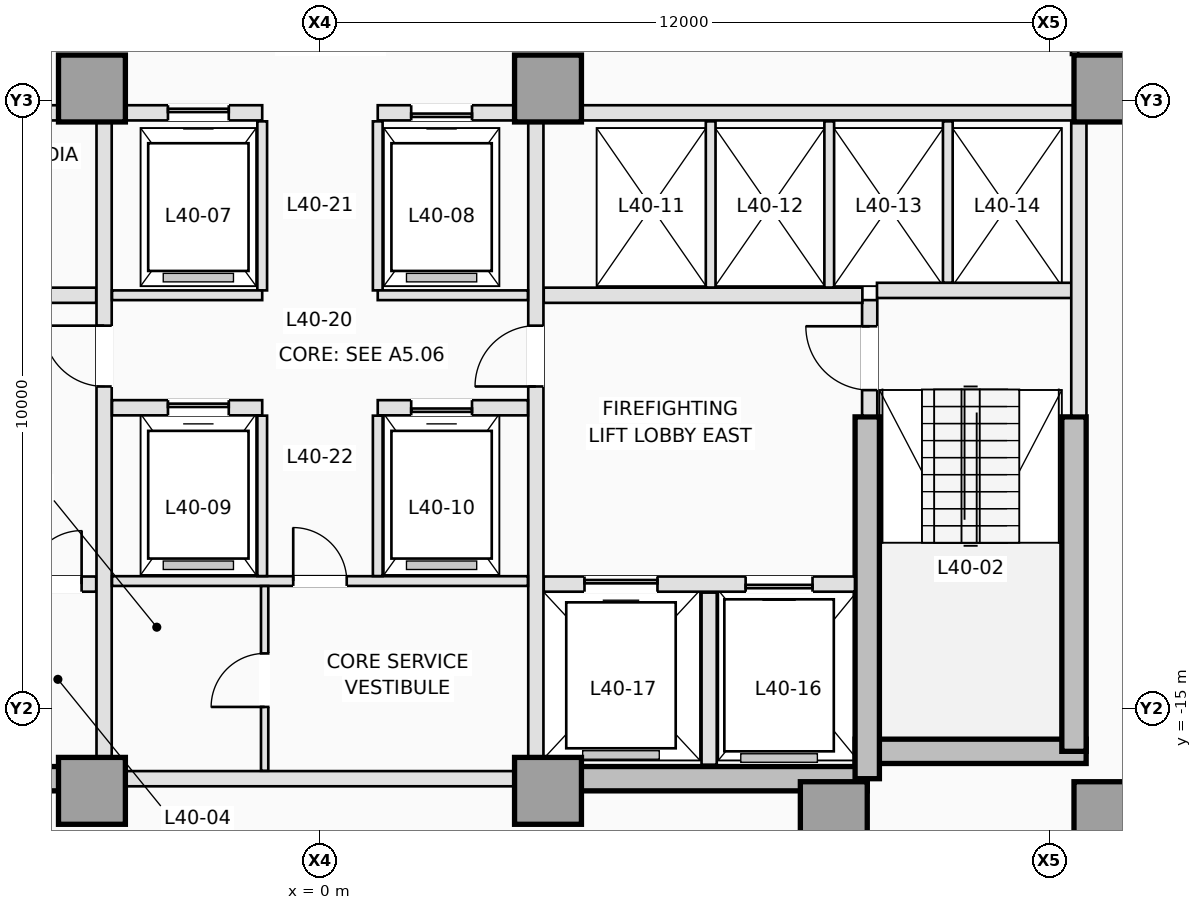
"""IFC4 building model, lengths in metres.
Left out: names, types, materials, properties, quantities, classifications, styles, units other than length and angle.
Written with IfcOpenShell. Run it as: python <this file> out.ifc"""

import sys

from ifc_helpers import new_model, si_unit, direction, frame, frame_2d, origin, origin_2d, place, context, subcontext, project, spatial, rectangle, extrude, element, fill, save


model = new_model("IFC4")
c1 = context("Model", 3, precision=1e-05, world=origin(), true_north=direction((0.0, 1.0)))
c2 = subcontext(c1, "Body", "Model", "MODEL_VIEW")
j1 = project(units=[si_unit("LENGTHUNIT", "METRE"), si_unit("PLANEANGLEUNIT", "RADIAN")], contexts=[c1])
p1 = place(None, origin())
s1 = spatial("IfcSite", under=j1, at=p1, CompositionType="ELEMENT")
p2 = place(p1, origin())
s2 = spatial("IfcBuilding", under=s1, at=p2, CompositionType="ELEMENT")
p3 = place(p2, frame((0.0, 0.0, 147.5)))
s3 = spatial("IfcBuildingStorey", under=s2, at=p3, CompositionType="ELEMENT", Elevation=147.5)
for number, where, z_axis, x_axis in (
    (1, (-9.0, -16.15, 0.0), (0.0, 0.0, 1.0), (1.0, 0.0, 0.0)),
    (2, (3.75, -16.15, 0.0), (0.0, 0.0, 1.0), (1.0, 0.0, 0.0)),
):
    element("IfcWall", number, at=place(p3, frame(where, z_axis=z_axis, x_axis=x_axis)), inside=s3, PredefinedType="SHEAR", context=c2, shape_type="SweptSolid", body=[
        extrude(rectangle(XDim=5.25, YDim=0.4, at=frame_2d((2.625, 0.0))), origin(), (0.0, 0.0, 1.0), 3.5),
    ])
p4 = place(p3, frame((8.8, -15.7, 0.0), z_axis=(0.0, 0.0, 1.0), x_axis=(1.0, 0.0, 0.0)))
e3 = element("IfcWall", 3, at=p4, inside=s3, PredefinedType="SHEAR", context=c2, shape_type="SweptSolid", body=[
    extrude(rectangle(XDim=3.8, YDim=0.4, at=frame_2d((1.9, 0.0))), origin(), (0.0, 0.0, 1.0), 3.5),
])
p5 = place(p3, frame((12.4, -15.7, 0.0), z_axis=(0.0, 0.0, 1.0), x_axis=(0.0, 1.0, 0.0)))
e4 = element("IfcWall", 4, at=p5, inside=s3, PredefinedType="SHEAR", context=c2, shape_type="SweptSolid", body=[
    extrude(rectangle(XDim=5.5, YDim=0.4, at=frame_2d((2.75, 0.0))), origin(), (0.0, 0.0, 1.0), 3.5),
])
p6 = place(p3, frame((9.0, -16.15, 0.0), z_axis=(0.0, 0.0, 1.0), x_axis=(0.0, 1.0, 0.0)))
e5 = element("IfcWall", 5, at=p6, inside=s3, PredefinedType="SHEAR", context=c2, shape_type="SweptSolid", body=[
    extrude(rectangle(XDim=5.95, YDim=0.4, at=frame_2d((2.975, 0.0))), origin(), (0.0, 0.0, 1.0), 3.5),
])
for number, where, z_axis, x_axis in (
    (6, (-3.75, -16.35, 0.0), (0.0, 0.0, 1.0), (1.0, 0.0, 0.0)),
    (7, (3.75, -16.35, 0.0), (0.0, 0.0, 1.0), (1.0, 0.0, 0.0)),
    (8, (8.45, -16.75, 0.0), (0.0, 0.0, 1.0), (1.0, 0.0, 0.0)),
    (9, (12.95, -16.75, 0.0), (0.0, 0.0, 1.0), (1.0, 0.0, 0.0)),
    (10, (-3.75, -4.8, 0.0), (0.0, 0.0, 1.0), (1.0, 0.0, 0.0)),
    (11, (3.75, -4.8, 0.0), (0.0, 0.0, 1.0), (1.0, 0.0, 0.0)),
    (12, (12.95, -4.8, 0.0), (0.0, 0.0, 1.0), (1.0, 0.0, 0.0)),
):
    element("IfcColumn", number, at=place(p3, frame(where, z_axis=z_axis, x_axis=x_axis)), inside=s3, PredefinedType="COLUMN", context=c2, shape_type="SweptSolid", body=[
        extrude(rectangle(XDim=1.1, YDim=1.1, at=origin_2d()), origin(), (0.0, 0.0, 1.0), 3.5),
    ])
p7 = place(p3, frame((9.04, -10.18, 0.0), z_axis=(0.0, 0.0, 1.0), x_axis=(0.0, 1.0, 0.0)))
e13 = element("IfcWall", 13, at=p7, inside=s3, PredefinedType="PARTITIONING", context=c2, shape_type="SweptSolid", body=[
    extrude(rectangle(XDim=1.9, YDim=0.25, at=frame_2d((0.95, 0.0))), origin(), (0.0, 0.0, 1.0), 3.25),
])
p8 = place(p7, frame((0.42, 0.0, 0.0)))
e14 = element("IfcOpeningElement", 14, at=p8, cuts=e13, PredefinedType="OPENING", context=c2, shape_type="SweptSolid", body=[
    extrude(rectangle(XDim=1.05, YDim=2.15, at=frame_2d((0.525, 1.075))), frame((0.0, 0.135, 0.0), z_axis=(0.0, -1.0, 0.0), x_axis=(1.0, 0.0, 0.0)), (0.0, 0.0, 1.0), 0.27),
])
p9 = place(p3, frame((9.16, -8.12, 0.0), z_axis=(0.0, 0.0, 1.0), x_axis=(1.0, 0.0, 0.0)))
e15 = element("IfcWall", 15, at=p9, inside=s3, PredefinedType="PARTITIONING", context=c2, shape_type="SweptSolid", body=[
    extrude(rectangle(XDim=3.22, YDim=0.25, at=frame_2d((1.61, 0.0))), origin(), (0.0, 0.0, 1.0), 3.25),
])
p10 = place(p3, frame((12.48, -10.18, 0.0), z_axis=(0.0, 0.0, 1.0), x_axis=(0.0, 1.0, 0.0)))
e16 = element("IfcWall", 16, at=p10, inside=s3, PredefinedType="PARTITIONING", context=c2, shape_type="SweptSolid", body=[
    extrude(rectangle(XDim=4.828, YDim=0.25, at=frame_2d((2.414, 0.0))), origin(), (0.0, 0.0, 1.0), 3.25),
])
p11 = place(p3, frame((-8.798, -12.95, 0.0), z_axis=(0.0, 0.0, 1.0), x_axis=(1.0, 0.0, 0.0)))
e17 = element("IfcWall", 17, at=p11, inside=s3, PredefinedType="PARTITIONING", context=c2, shape_type="SweptSolid", body=[
    extrude(rectangle(XDim=5.118, YDim=0.25, at=frame_2d((2.559, 0.0))), origin(), (0.0, 0.0, 1.0), 3.25),
])
p12 = place(p11, frame((0.698, 0.0, 0.0)))
e18 = element("IfcOpeningElement", 18, at=p12, cuts=e17, PredefinedType="OPENING", context=c2, shape_type="SweptSolid", body=[
    extrude(rectangle(XDim=1.1, YDim=2.15, at=frame_2d((0.55, 1.075))), frame((0.0, 0.135, 0.0), z_axis=(0.0, -1.0, 0.0), x_axis=(1.0, 0.0, 0.0)), (0.0, 0.0, 1.0), 0.27),
])
p13 = place(p11, frame((2.598, 0.0, 0.0)))
e19 = element("IfcOpeningElement", 19, at=p13, cuts=e17, PredefinedType="OPENING", context=c2, shape_type="SweptSolid", body=[
    extrude(rectangle(XDim=0.88, YDim=2.1, at=frame_2d((0.44, 1.05))), frame((0.0, 0.135, 0.0), z_axis=(0.0, -1.0, 0.0), x_axis=(1.0, 0.0, 0.0)), (0.0, 0.0, 1.0), 0.27),
])
p14 = place(p11, frame((3.998, 0.0, 0.0)))
e20 = element("IfcOpeningElement", 20, at=p14, cuts=e17, PredefinedType="OPENING", context=c2, shape_type="SweptSolid", body=[
    extrude(rectangle(XDim=0.88, YDim=2.1, at=frame_2d((0.44, 1.05))), frame((0.0, 0.135, 0.0), z_axis=(0.0, -1.0, 0.0), x_axis=(1.0, 0.0, 0.0)), (0.0, 0.0, 1.0), 0.27),
])
p15 = place(p3, frame((3.68, -12.95, 0.0), z_axis=(0.0, 0.0, 1.0), x_axis=(1.0, 0.0, 0.0)))
e21 = element("IfcWall", 21, at=p15, inside=s3, PredefinedType="PARTITIONING", context=c2, shape_type="SweptSolid", body=[
    extrude(rectangle(XDim=5.118, YDim=0.25, at=frame_2d((2.559, 0.0))), origin(), (0.0, 0.0, 1.0), 3.25),
])
p16 = place(p15, frame((3.32, 0.0, 0.0)))
e22 = element("IfcOpeningElement", 22, at=p16, cuts=e21, PredefinedType="OPENING", context=c2, shape_type="SweptSolid", body=[
    extrude(rectangle(XDim=1.1, YDim=2.15, at=frame_2d((0.55, 1.075))), frame((0.0, 0.135, 0.0), z_axis=(0.0, -1.0, 0.0), x_axis=(1.0, 0.0, 0.0)), (0.0, 0.0, 1.0), 0.27),
])
p17 = place(p15, frame((0.67, 0.0, 0.0)))
e23 = element("IfcOpeningElement", 23, at=p17, cuts=e21, PredefinedType="OPENING", context=c2, shape_type="SweptSolid", body=[
    extrude(rectangle(XDim=1.2, YDim=2.15, at=frame_2d((0.6, 1.075))), frame((0.0, 0.135, 0.0), z_axis=(0.0, -1.0, 0.0), x_axis=(1.0, 0.0, 0.0)), (0.0, 0.0, 1.0), 0.27),
])
p18 = place(p3, frame((6.4, -15.92, 0.0), z_axis=(0.0, 0.0, 1.0), x_axis=(0.0, 1.0, 0.0)))
e24 = element("IfcWall", 24, at=p18, inside=s3, PredefinedType="PARTITIONING", context=c2, shape_type="SweptSolid", body=[
    extrude(rectangle(XDim=2.83, YDim=0.25, at=frame_2d((1.415, 0.0))), origin(), (0.0, 0.0, 1.0), 3.25),
])
for number, where, z_axis, x_axis in (
    (25, (-8.92, -8.2, 0.0), (0.0, 0.0, 1.0), (1.0, 0.0, 0.0)),
    (26, (3.68, -8.2, 0.0), (0.0, 0.0, 1.0), (1.0, 0.0, 0.0)),
):
    element("IfcWall", number, at=place(p3, frame(where, z_axis=z_axis, x_axis=x_axis)), inside=s3, PredefinedType="PARTITIONING", context=c2, shape_type="SweptSolid", body=[
        extrude(rectangle(XDim=5.24, YDim=0.25, at=frame_2d((2.62, 0.0))), origin(), (0.0, 0.0, 1.0), 3.25),
    ])
p19 = place(p3, frame((-3.55, -15.798, 0.0), z_axis=(0.0, 0.0, 1.0), x_axis=(0.0, 1.0, 0.0)))
e27 = element("IfcWall", 27, at=p19, inside=s3, PredefinedType="PARTITIONING", context=c2, shape_type="SweptSolid", body=[
    extrude(rectangle(XDim=10.446, YDim=0.25, at=frame_2d((5.223, 0.0))), origin(), (0.0, 0.0, 1.0), 3.25),
])
p20 = place(p19, frame((6.098, 0.0, 0.0)))
e28 = element("IfcOpeningElement", 28, at=p20, cuts=e27, PredefinedType="OPENING", context=c2, shape_type="SweptSolid", body=[
    extrude(rectangle(XDim=1.0, YDim=2.15, at=frame_2d((0.5, 1.075))), frame((0.0, 0.135, 0.0), z_axis=(0.0, -1.0, 0.0), x_axis=(1.0, 0.0, 0.0)), (0.0, 0.0, 1.0), 0.27),
])
p21 = place(p3, frame((3.55, -15.798, 0.0), z_axis=(0.0, 0.0, 1.0), x_axis=(0.0, 1.0, 0.0)))
e29 = element("IfcWall", 29, at=p21, inside=s3, PredefinedType="PARTITIONING", context=c2, shape_type="SweptSolid", body=[
    extrude(rectangle(XDim=10.446, YDim=0.25, at=frame_2d((5.223, 0.0))), origin(), (0.0, 0.0, 1.0), 3.25),
])
p22 = place(p21, frame((6.098, 0.0, 0.0)))
e30 = element("IfcOpeningElement", 30, at=p22, cuts=e29, PredefinedType="OPENING", context=c2, shape_type="SweptSolid", body=[
    extrude(rectangle(XDim=1.0, YDim=2.15, at=frame_2d((0.5, 1.075))), frame((0.0, 0.135, 0.0), z_axis=(0.0, -1.0, 0.0), x_axis=(1.0, 0.0, 0.0)), (0.0, 0.0, 1.0), 0.27),
])
p23 = place(p3, frame((-12.398, -5.2, 0.0), z_axis=(0.0, 0.0, 1.0), x_axis=(1.0, 0.0, 0.0)))
e31 = element("IfcWall", 31, at=p23, inside=s3, PredefinedType="PARTITIONING", context=c2, shape_type="SweptSolid", body=[
    extrude(rectangle(XDim=8.096, YDim=0.25, at=frame_2d((4.048, 0.0))), origin(), (0.0, 0.0, 1.0), 3.25),
])
p24 = place(p23, frame((2.968, 0.0, 0.0)))
e32 = element("IfcOpeningElement", 32, at=p24, cuts=e31, PredefinedType="OPENING", context=c2, shape_type="SweptSolid", body=[
    extrude(rectangle(XDim=0.92, YDim=2.12, at=frame_2d((0.46, 1.06))), frame((0.0, 0.135, 0.0), z_axis=(0.0, -1.0, 0.0), x_axis=(1.0, 0.0, 0.0)), (0.0, 0.0, 1.0), 0.27),
])
p25 = place(p23, frame((6.068, 0.0, 0.0)))
e33 = element("IfcOpeningElement", 33, at=p25, cuts=e31, PredefinedType="OPENING", context=c2, shape_type="SweptSolid", body=[
    extrude(rectangle(XDim=0.92, YDim=2.12, at=frame_2d((0.46, 1.06))), frame((0.0, 0.135, 0.0), z_axis=(0.0, -1.0, 0.0), x_axis=(1.0, 0.0, 0.0)), (0.0, 0.0, 1.0), 0.27),
])
p26 = place(p3, frame((4.302, -5.2, 0.0), z_axis=(0.0, 0.0, 1.0), x_axis=(1.0, 0.0, 0.0)))
e34 = element("IfcWall", 34, at=p26, inside=s3, PredefinedType="PARTITIONING", context=c2, shape_type="SweptSolid", body=[
    extrude(rectangle(XDim=8.096, YDim=0.25, at=frame_2d((4.048, 0.0))), origin(), (0.0, 0.0, 1.0), 3.25),
])
p27 = place(p3, frame((-3.198, -5.2, 0.0), z_axis=(0.0, 0.0, 1.0), x_axis=(1.0, 0.0, 0.0)))
e35 = element("IfcWall", 35, at=p27, inside=s3, PredefinedType="PARTITIONING", context=c2, shape_type="SweptSolid", body=[
    extrude(rectangle(XDim=2.248, YDim=0.25, at=frame_2d((1.124, 0.0))), origin(), (0.0, 0.0, 1.0), 3.25),
])
p28 = place(p27, frame((0.698, 0.0, 0.0)))
e36 = element("IfcOpeningElement", 36, at=p28, cuts=e35, PredefinedType="OPENING", context=c2, shape_type="SweptSolid", body=[
    extrude(rectangle(XDim=1.0, YDim=2.15, at=frame_2d((0.5, 1.075))), frame((0.0, 0.135, 0.0), z_axis=(0.0, -1.0, 0.0), x_axis=(1.0, 0.0, 0.0)), (0.0, 0.0, 1.0), 0.27),
])
p29 = place(p3, frame((0.95, -5.2, 0.0), z_axis=(0.0, 0.0, 1.0), x_axis=(1.0, 0.0, 0.0)))
e37 = element("IfcWall", 37, at=p29, inside=s3, PredefinedType="PARTITIONING", context=c2, shape_type="SweptSolid", body=[
    extrude(rectangle(XDim=2.248, YDim=0.25, at=frame_2d((1.124, 0.0))), origin(), (0.0, 0.0, 1.0), 3.25),
])
p30 = place(p29, frame((0.55, 0.0, 0.0)))
e38 = element("IfcOpeningElement", 38, at=p30, cuts=e37, PredefinedType="OPENING", context=c2, shape_type="SweptSolid", body=[
    extrude(rectangle(XDim=1.0, YDim=2.15, at=frame_2d((0.5, 1.075))), frame((0.0, 0.135, 0.0), z_axis=(0.0, -1.0, 0.0), x_axis=(1.0, 0.0, 0.0)), (0.0, 0.0, 1.0), 0.27),
])
for number, where, z_axis, x_axis in (
    (39, (6.425, -8.073, 0.0), (0.0, 0.0, 1.0), (0.0, 1.0, 0.0)),
    (40, (8.375, -8.073, 0.0), (0.0, 0.0, 1.0), (0.0, 1.0, 0.0)),
):
    element("IfcWall", number, at=place(p3, frame(where, z_axis=z_axis, x_axis=x_axis)), inside=s3, PredefinedType="PARTITIONING", context=c2, shape_type="SweptSolid", body=[
        extrude(rectangle(XDim=2.733, YDim=0.16, at=frame_2d((1.366, 0.0))), origin(), (0.0, 0.0, 1.0), 3.25),
    ])
p31 = place(p3, frame((10.325, -7.993, 0.0), z_axis=(0.0, 0.0, 1.0), x_axis=(0.0, 1.0, 0.0)))
e41 = element("IfcWall", 41, at=p31, inside=s3, PredefinedType="PARTITIONING", context=c2, shape_type="SweptSolid", body=[
    extrude(rectangle(XDim=2.653, YDim=0.16, at=frame_2d((1.326, 0.0))), origin(), (0.0, 0.0, 1.0), 3.25),
])
p32 = place(p3, frame((-3.198, -16.15, 0.0), z_axis=(0.0, 0.0, 1.0), x_axis=(1.0, 0.0, 0.0)))
e42 = element("IfcWall", 42, at=p32, inside=s3, PredefinedType="PARTITIONING", context=c2, shape_type="SweptSolid", body=[
    extrude(rectangle(XDim=6.396, YDim=0.25, at=frame_2d((3.198, 0.0))), origin(), (0.0, 0.0, 1.0), 2.45),
])
for number, where, z_axis, x_axis in (
    (43, (-0.95, -8.12, 0.0), (0.0, 0.0, 1.0), (0.0, 1.0, 0.0)),
    (44, (0.95, -8.12, 0.0), (0.0, 0.0, 1.0), (0.0, 1.0, 0.0)),
):
    element("IfcWall", number, at=place(p3, frame(where, z_axis=z_axis, x_axis=x_axis)), inside=s3, PredefinedType="PARTITIONING", context=c2, shape_type="SweptSolid", body=[
        extrude(rectangle(XDim=2.78, YDim=0.16, at=frame_2d((1.39, 0.0))), origin(), (0.0, 0.0, 1.0), 3.25),
    ])
for number, where, z_axis, x_axis in (
    (45, (-3.42, -8.2, 0.0), (0.0, 0.0, 1.0), (1.0, 0.0, 0.0)),
    (46, (0.95, -8.2, 0.0), (0.0, 0.0, 1.0), (1.0, 0.0, 0.0)),
):
    element("IfcWall", number, at=place(p3, frame(where, z_axis=z_axis, x_axis=x_axis)), inside=s3, PredefinedType="PARTITIONING", context=c2, shape_type="SweptSolid", body=[
        extrude(rectangle(XDim=2.47, YDim=0.16, at=frame_2d((1.235, 0.0))), origin(), (0.0, 0.0, 1.0), 3.25),
    ])
p33 = place(p3, frame((-3.42, -10.05, 0.0), z_axis=(0.0, 0.0, 1.0), x_axis=(1.0, 0.0, 0.0)))
e47 = element("IfcWall", 47, at=p33, inside=s3, PredefinedType="PARTITIONING", context=c2, shape_type="SweptSolid", body=[
    extrude(rectangle(XDim=2.47, YDim=0.25, at=frame_2d((1.235, 0.0))), origin(), (0.0, 0.0, 1.0), 3.25),
])
p34 = place(p33, frame((0.92, 0.0, 0.0)))
e48 = element("IfcOpeningElement", 48, at=p34, cuts=e47, PredefinedType="OPENING", context=c2, shape_type="SweptSolid", body=[
    extrude(rectangle(XDim=1.0, YDim=2.15, at=frame_2d((0.5, 1.075))), frame((0.0, 0.135, 0.0), z_axis=(0.0, -1.0, 0.0), x_axis=(1.0, 0.0, 0.0)), (0.0, 0.0, 1.0), 0.27),
])
p35 = place(p3, frame((0.95, -10.05, 0.0), z_axis=(0.0, 0.0, 1.0), x_axis=(1.0, 0.0, 0.0)))
e49 = element("IfcWall", 49, at=p35, inside=s3, PredefinedType="PARTITIONING", context=c2, shape_type="SweptSolid", body=[
    extrude(rectangle(XDim=2.47, YDim=0.25, at=frame_2d((1.235, 0.0))), origin(), (0.0, 0.0, 1.0), 3.25),
])
p36 = place(p35, frame((0.55, 0.0, 0.0)))
e50 = element("IfcOpeningElement", 50, at=p36, cuts=e49, PredefinedType="OPENING", context=c2, shape_type="SweptSolid", body=[
    extrude(rectangle(XDim=1.0, YDim=2.15, at=frame_2d((0.5, 1.075))), frame((0.0, 0.135, 0.0), z_axis=(0.0, -1.0, 0.0), x_axis=(1.0, 0.0, 0.0)), (0.0, 0.0, 1.0), 0.27),
])
p37 = place(p3, frame((-3.42, -12.9, 0.0), z_axis=(0.0, 0.0, 1.0), x_axis=(1.0, 0.0, 0.0)))
e51 = element("IfcWall", 51, at=p37, inside=s3, PredefinedType="PARTITIONING", context=c2, shape_type="SweptSolid", body=[
    extrude(rectangle(XDim=6.84, YDim=0.16, at=frame_2d((3.42, 0.0))), origin(), (0.0, 0.0, 1.0), 3.25),
])
p38 = place(p37, frame((2.98, 0.0, 0.0)))
e52 = element("IfcOpeningElement", 52, at=p38, cuts=e51, PredefinedType="OPENING", context=c2, shape_type="SweptSolid", body=[
    extrude(rectangle(XDim=0.88, YDim=2.12, at=frame_2d((0.44, 1.06))), frame((0.0, 0.09, 0.0), z_axis=(0.0, -1.0, 0.0), x_axis=(1.0, 0.0, 0.0)), (0.0, 0.0, 1.0), 0.18),
])
for number, where, z_axis, x_axis in (
    (53, (-0.95, -12.818, 0.0), (0.0, 0.0, 1.0), (0.0, 1.0, 0.0)),
    (54, (0.95, -12.818, 0.0), (0.0, 0.0, 1.0), (0.0, 1.0, 0.0)),
):
    element("IfcWall", number, at=place(p3, frame(where, z_axis=z_axis, x_axis=x_axis)), inside=s3, PredefinedType="PARTITIONING", context=c2, shape_type="SweptSolid", body=[
        extrude(rectangle(XDim=2.638, YDim=0.16, at=frame_2d((1.319, 0.0))), origin(), (0.0, 0.0, 1.0), 3.25),
    ])
p39 = place(p3, frame((-0.91, -16.02, 0.0), z_axis=(0.0, 0.0, 1.0), x_axis=(0.0, 1.0, 0.0)))
e55 = element("IfcWall", 55, at=p39, inside=s3, PredefinedType="PARTITIONING", context=c2, shape_type="SweptSolid", body=[
    extrude(rectangle(XDim=3.038, YDim=0.12, at=frame_2d((1.519, 0.0))), origin(), (0.0, 0.0, 1.0), 3.25),
])
p40 = place(p39, frame((1.05, 0.0, 0.0)))
e56 = element("IfcOpeningElement", 56, at=p40, cuts=e55, PredefinedType="OPENING", context=c2, shape_type="SweptSolid", body=[
    extrude(rectangle(XDim=0.88, YDim=2.12, at=frame_2d((0.44, 1.06))), frame((0.0, 0.07, 0.0), z_axis=(0.0, -1.0, 0.0), x_axis=(1.0, 0.0, 0.0)), (0.0, 0.0, 1.0), 0.14),
])
p41 = place(p3, frame((12.41, -2.462, 0.0), z_axis=(0.0, 0.0, 1.0), x_axis=(0.0, -1.0, 0.0)))
e57 = element("IfcWall", 57, at=p41, inside=s3, PredefinedType="PARTITIONING", context=c2, shape_type="SweptSolid", body=[
    extrude(rectangle(XDim=1.786, YDim=0.12, at=frame_2d((0.893, 0.0))), origin(), (0.0, 0.0, 1.0), 3.25),
])
p42 = place(p28, origin())
e58 = element("IfcDoor", 58, at=p42, inside=s3, OperationType="SLIDING_TO_LEFT", PredefinedType="DOOR", context=c2, shape_type="SweptSolid", body=[
    extrude(rectangle(XDim=1.0, YDim=2.15, at=frame_2d((0.5, 1.075))), frame((0.0, 0.025, 0.0), z_axis=(0.0, -1.0, 0.0), x_axis=(1.0, 0.0, 0.0)), (0.0, 0.0, 1.0), 0.05),
])
fill(e36, e58)
p43 = place(p30, origin())
e59 = element("IfcDoor", 59, at=p43, inside=s3, OperationType="SLIDING_TO_RIGHT", PredefinedType="DOOR", context=c2, shape_type="SweptSolid", body=[
    extrude(rectangle(XDim=1.0, YDim=2.15, at=frame_2d((0.5, 1.075))), frame((0.0, 0.025, 0.0), z_axis=(0.0, -1.0, 0.0), x_axis=(1.0, 0.0, 0.0)), (0.0, 0.0, 1.0), 0.05),
])
fill(e38, e59)
p44 = place(p16, origin())
e60 = element("IfcDoor", 60, at=p44, inside=s3, OperationType="SLIDING_TO_RIGHT", PredefinedType="DOOR", context=c2, shape_type="SweptSolid", body=[
    extrude(rectangle(XDim=1.1, YDim=2.15, at=frame_2d((0.55, 1.075))), frame((0.0, 0.025, 0.0), z_axis=(0.0, -1.0, 0.0), x_axis=(1.0, 0.0, 0.0)), (0.0, 0.0, 1.0), 0.05),
])
fill(e22, e60)
p45 = place(p17, origin())
e61 = element("IfcDoor", 61, at=p45, inside=s3, OperationType="SLIDING_TO_LEFT", PredefinedType="DOOR", context=c2, shape_type="SweptSolid", body=[
    extrude(rectangle(XDim=1.2, YDim=2.15, at=frame_2d((0.6, 1.075))), frame((0.0, 0.025, 0.0), z_axis=(0.0, -1.0, 0.0), x_axis=(1.0, 0.0, 0.0)), (0.0, 0.0, 1.0), 0.05),
])
fill(e23, e61)
p46 = place(p34, origin())
e62 = element("IfcDoor", 62, at=p46, inside=s3, OperationType="SLIDING_TO_LEFT", PredefinedType="DOOR", context=c2, shape_type="SweptSolid", body=[
    extrude(rectangle(XDim=1.0, YDim=2.15, at=frame_2d((0.5, 1.075))), frame((0.0, 0.025, 0.0), z_axis=(0.0, -1.0, 0.0), x_axis=(1.0, 0.0, 0.0)), (0.0, 0.0, 1.0), 0.05),
])
fill(e48, e62)
p47 = place(p36, origin())
e63 = element("IfcDoor", 63, at=p47, inside=s3, OperationType="SLIDING_TO_RIGHT", PredefinedType="DOOR", context=c2, shape_type="SweptSolid", body=[
    extrude(rectangle(XDim=1.0, YDim=2.15, at=frame_2d((0.5, 1.075))), frame((0.0, 0.025, 0.0), z_axis=(0.0, -1.0, 0.0), x_axis=(1.0, 0.0, 0.0)), (0.0, 0.0, 1.0), 0.05),
])
fill(e50, e63)
p48 = place(p8, origin())
e64 = element("IfcDoor", 64, at=p48, inside=s3, OperationType="SINGLE_SWING_RIGHT", PredefinedType="DOOR", context=c2, shape_type="SweptSolid", body=[
    extrude(rectangle(XDim=1.05, YDim=2.15, at=frame_2d((0.525, 1.075))), frame((0.0, 0.025, 0.0), z_axis=(0.0, -1.0, 0.0), x_axis=(1.0, 0.0, 0.0)), (0.0, 0.0, 1.0), 0.05),
])
fill(e14, e64)
p49 = place(p14, origin())
e65 = element("IfcDoor", 65, at=p49, inside=s3, OperationType="SINGLE_SWING_RIGHT", PredefinedType="TRAPDOOR", context=c2, shape_type="SweptSolid", body=[
    extrude(rectangle(XDim=0.88, YDim=2.1, at=frame_2d((0.44, 1.05))), frame((0.0, 0.025, 0.0), z_axis=(0.0, -1.0, 0.0), x_axis=(1.0, 0.0, 0.0)), (0.0, 0.0, 1.0), 0.05),
])
fill(e20, e65)
p50 = place(p20, origin())
e66 = element("IfcDoor", 66, at=p50, inside=s3, OperationType="SINGLE_SWING_RIGHT", PredefinedType="DOOR", context=c2, shape_type="SweptSolid", body=[
    extrude(rectangle(XDim=1.0, YDim=2.15, at=frame_2d((0.5, 1.075))), frame((0.0, 0.025, 0.0), z_axis=(0.0, -1.0, 0.0), x_axis=(1.0, 0.0, 0.0)), (0.0, 0.0, 1.0), 0.05),
])
fill(e28, e66)
p51 = place(p22, origin())
e67 = element("IfcDoor", 67, at=p51, inside=s3, OperationType="SINGLE_SWING_LEFT", PredefinedType="DOOR", context=c2, shape_type="SweptSolid", body=[
    extrude(rectangle(XDim=1.0, YDim=2.15, at=frame_2d((0.5, 1.075))), frame((0.0, 0.025, 0.0), z_axis=(0.0, -1.0, 0.0), x_axis=(1.0, 0.0, 0.0)), (0.0, 0.0, 1.0), 0.05),
])
fill(e30, e67)
p52 = place(p38, origin())
e68 = element("IfcDoor", 68, at=p52, inside=s3, OperationType="SINGLE_SWING_LEFT", PredefinedType="DOOR", context=c2, shape_type="SweptSolid", body=[
    extrude(rectangle(XDim=0.88, YDim=2.12, at=frame_2d((0.44, 1.06))), frame((0.0, 0.025, 0.0), z_axis=(0.0, -1.0, 0.0), x_axis=(1.0, 0.0, 0.0)), (0.0, 0.0, 1.0), 0.05),
])
fill(e52, e68)
p53 = place(p40, origin())
e69 = element("IfcDoor", 69, at=p53, inside=s3, OperationType="SINGLE_SWING_LEFT", PredefinedType="DOOR", context=c2, shape_type="SweptSolid", body=[
    extrude(rectangle(XDim=0.88, YDim=2.12, at=frame_2d((0.44, 1.06))), frame((0.0, 0.025, 0.0), z_axis=(0.0, -1.0, 0.0), x_axis=(1.0, 0.0, 0.0)), (0.0, 0.0, 1.0), 0.05),
])
fill(e56, e69)
save(model, sys.argv[1])
